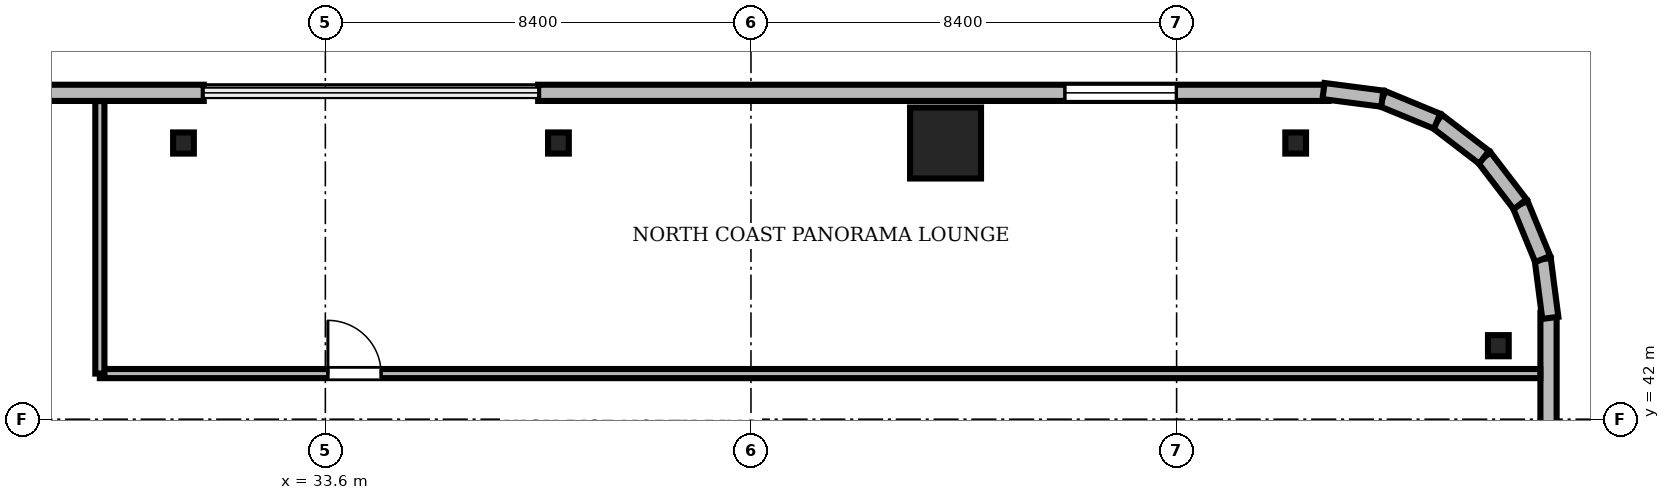
"""IFC4 building model, lengths in metres.
Left out: names, types, materials, properties, quantities, classifications, styles, units other than length and angle.
Written with IfcOpenShell. Run it as: python <this file> out.ifc"""

import sys

from ifc_helpers import new_model, si_unit, direction, frame, frame_2d, origin, origin_2d, place, context, subcontext, project, spatial, rectangle, i_section, extrude, source, transform, mapped, element, fill, save


model = new_model("IFC4")
c1 = context("Model", 3, precision=1e-05, world=origin(), true_north=direction((0.0, 1.0)))
c2 = subcontext(c1, "Body", "Model", "MODEL_VIEW")
j1 = project(units=[si_unit("LENGTHUNIT", "METRE"), si_unit("PLANEANGLEUNIT", "RADIAN")], contexts=[c1])
p1 = place(None, origin())
s1 = spatial("IfcSite", under=j1, at=p1, CompositionType="ELEMENT")
p2 = place(p1, origin())
s2 = spatial("IfcBuilding", under=s1, at=p2, CompositionType="ELEMENT")
p3 = place(p2, frame((0.0, 0.0, 222.3)))
s3 = spatial("IfcBuildingStorey", under=s2, at=p3, CompositionType="ELEMENT", Elevation=222.3)
m1 = source(origin(), c2, "Body", "SweptSolid", [
    extrude(rectangle(XDim=1.4, YDim=1.4, at=origin_2d()), origin(), (0.0, 0.0, 1.0), 3.53),
])
p4 = place(p3, frame((45.84, 47.45, 0.0), z_axis=(0.0, 0.0, 1.0), x_axis=(1.0, 0.0, 0.0)))
e1 = element("IfcColumn", 1, at=p4, inside=s3, PredefinedType="COLUMN", context=c2, shape_type="MappedRepresentation", body=[
    mapped(m1, transform((0.0, 0.0, 0.0), scale=1.0)),
])
m2 = source(origin(), c2, "Body", "SweptSolid", [
    extrude(i_section(OverallWidth=0.409, OverallDepth=0.417, WebThickness=0.021, FlangeThickness=0.033, FilletRadius=0.015, at=origin_2d()), origin(), (0.0, 0.0, 1.0), 3.53),
])
for number, where, z_axis, x_axis in (
    (2, (56.75, 43.45, 0.0), (0.0, 0.0, 1.0), (1.0, 0.0, 0.0)),
    (3, (52.75, 47.45, 0.0), (0.0, 0.0, 1.0), (1.0, 0.0, 0.0)),
    (4, (38.2, 47.45, 0.0), (0.0, 0.0, 1.0), (1.0, 0.0, 0.0)),
    (5, (30.8, 47.45, 0.0), (0.0, 0.0, 1.0), (1.0, 0.0, 0.0)),
):
    element("IfcColumn", number, at=place(p3, frame(where, z_axis=z_axis, x_axis=x_axis)), inside=s3, PredefinedType="COLUMN", context=c2, shape_type="MappedRepresentation", body=[
        mapped(m2, transform((0.0, 0.0, 0.0), scale=1.0)),
    ])
m3 = source(origin(), c2, "Body", "SweptSolid", [
    extrude(rectangle(XDim=15.6, YDim=0.32, at=frame_2d((7.8, 0.0))), origin(), (0.0, 0.0, 1.0), 3.53),
])
p5 = place(p3, frame((53.4, 48.44, 0.0), z_axis=(0.0, 0.0, 1.0), x_axis=(-1.0, 0.0, 0.0)))
e6 = element("IfcWall", 6, at=p5, inside=s3, PredefinedType="SOLIDWALL", context=c2, shape_type="MappedRepresentation", body=[
    mapped(m3, transform((0.0, 0.0, 0.0), scale=1.0)),
])
m4 = source(origin(), c2, "Body", "SweptSolid", [
    extrude(rectangle(XDim=2.2, YDim=2.4, at=frame_2d((1.1, 1.2))), frame((0.0, 0.17, 0.0), z_axis=(0.0, -1.0, 0.0), x_axis=(1.0, 0.0, 0.0)), (0.0, 0.0, 1.0), 0.34),
])
p6 = place(p5, frame((3.005, 0.0, 0.72)))
e7 = element("IfcOpeningElement", 7, at=p6, cuts=e6, PredefinedType="OPENING", context=c2, shape_type="MappedRepresentation", body=[
    mapped(m4, transform((0.0, 0.0, 0.0), scale=1.0)),
])
p7 = place(p3, frame((31.2, 48.44, 0.0), z_axis=(0.0, 0.0, 1.0), x_axis=(-1.0, 0.0, 0.0)))
e8 = element("IfcWall", 8, at=p7, inside=s3, PredefinedType="SOLIDWALL", context=c2, shape_type="MappedRepresentation", body=[
    mapped(m3, transform((0.0, 0.0, 0.0), scale=1.0)),
])
m5 = source(origin(), c2, "Body", "SweptSolid", [
    extrude(rectangle(XDim=1.4, YDim=2.3, at=frame_2d((0.7, 1.15))), frame((0.0, 0.17, 0.0), z_axis=(0.0, -1.0, 0.0), x_axis=(1.0, 0.0, 0.0)), (0.0, 0.0, 1.0), 0.34),
])
p8 = place(p7, frame((4.59, 0.0, 0.0)))
e9 = element("IfcOpeningElement", 9, at=p8, cuts=e8, PredefinedType="OPENING", context=c2, shape_type="MappedRepresentation", body=[
    mapped(m5, transform((0.0, 0.0, 0.0), scale=1.0)),
])
p9 = place(p7, frame((10.395, 0.0, 0.72)))
e10 = element("IfcOpeningElement", 10, at=p9, cuts=e8, PredefinedType="OPENING", context=c2, shape_type="MappedRepresentation", body=[
    mapped(m4, transform((0.0, 0.0, 0.0), scale=1.0)),
])
m6 = source(origin(), c2, "Body", "SweptSolid", [
    extrude(rectangle(XDim=15.6, YDim=0.32, at=frame_2d((7.8, 0.0))), origin(), (0.0, 0.0, 1.0), 3.53),
])
p10 = place(p3, frame((57.74, 28.5, 0.0), z_axis=(0.0, 0.0, 1.0), x_axis=(0.0, 1.0, 0.0)))
e11 = element("IfcWall", 11, at=p10, inside=s3, PredefinedType="SOLIDWALL", context=c2, shape_type="MappedRepresentation", body=[
    mapped(m6, transform((0.0, 0.0, 0.0), scale=1.0)),
])
p11 = place(p10, frame((10.395, 0.0, 0.72)))
e12 = element("IfcOpeningElement", 12, at=p11, cuts=e11, PredefinedType="OPENING", context=c2, shape_type="MappedRepresentation", body=[
    mapped(m4, transform((0.0, 0.0, 0.0), scale=1.0)),
])
m7 = source(origin(), c2, "Body", "SweptSolid", [
    extrude(rectangle(XDim=1.17, YDim=0.32, at=frame_2d((0.585, 0.0))), origin(), (0.0, 0.0, 1.0), 3.53),
])
p12 = place(p3, frame((57.776, 44.0, 0.0), z_axis=(0.0, 0.0, 1.0), x_axis=(-0.128295670475, 0.991735963317, 0.0)))
e13 = element("IfcWall", 13, at=p12, inside=s3, PredefinedType="SOLIDWALL", context=c2, shape_type="MappedRepresentation", body=[
    mapped(m7, transform((0.0, 0.0, 0.0), scale=1.0)),
])
m8 = source(origin(), c2, "Body", "SweptSolid", [
    extrude(rectangle(XDim=1.169, YDim=0.32, at=frame_2d((0.584, 0.0))), origin(), (0.0, 0.0, 1.0), 3.53),
])
p13 = place(p3, frame((57.625, 45.16, 0.0), z_axis=(0.0, 0.0, 1.0), x_axis=(-0.381054331552, 0.924552646638, 0.0)))
e14 = element("IfcWall", 14, at=p13, inside=s3, PredefinedType="SOLIDWALL", context=c2, shape_type="MappedRepresentation", body=[
    mapped(m8, transform((0.0, 0.0, 0.0), scale=1.0)),
])
m9 = source(origin(), c2, "Body", "SweptSolid", [
    extrude(rectangle(XDim=1.169, YDim=0.32, at=frame_2d((0.584, 0.0))), origin(), (0.0, 0.0, 1.0), 3.53),
])
p14 = place(p3, frame((57.18, 46.241, 0.0), z_axis=(0.0, 0.0, 1.0), x_axis=(-0.608387696831, 0.793639975269, 0.0)))
e15 = element("IfcWall", 15, at=p14, inside=s3, PredefinedType="SOLIDWALL", context=c2, shape_type="MappedRepresentation", body=[
    mapped(m9, transform((0.0, 0.0, 0.0), scale=1.0)),
])
m10 = source(origin(), c2, "Body", "SweptSolid", [
    extrude(rectangle(XDim=1.169, YDim=0.32, at=frame_2d((0.584, 0.0))), origin(), (0.0, 0.0, 1.0), 3.53),
])
p15 = place(p3, frame((56.469, 47.169, 0.0), z_axis=(0.0, 0.0, 1.0), x_axis=(-0.793663520347, 0.608356981114, 0.0)))
e16 = element("IfcWall", 16, at=p15, inside=s3, PredefinedType="SOLIDWALL", context=c2, shape_type="MappedRepresentation", body=[
    mapped(m10, transform((0.0, 0.0, 0.0), scale=1.0)),
])
p16 = place(p3, frame((55.541, 47.88, 0.0), z_axis=(0.0, 0.0, 1.0), x_axis=(-0.924552646638, 0.381054331552, 0.0)))
e17 = element("IfcWall", 17, at=p16, inside=s3, PredefinedType="SOLIDWALL", context=c2, shape_type="MappedRepresentation", body=[
    mapped(m8, transform((0.0, 0.0, 0.0), scale=1.0)),
])
p17 = place(p3, frame((54.46, 48.325, 0.0), z_axis=(0.0, 0.0, 1.0), x_axis=(-0.991735963317, 0.128295670475, 0.0)))
e18 = element("IfcWall", 18, at=p17, inside=s3, PredefinedType="SOLIDWALL", context=c2, shape_type="MappedRepresentation", body=[
    mapped(m7, transform((0.0, 0.0, 0.0), scale=1.0)),
])
m11 = source(origin(), c2, "Body", "SweptSolid", [
    extrude(rectangle(XDim=28.428, YDim=0.18, at=frame_2d((14.214, 0.0))), origin(), (0.0, 0.0, 1.0), 2.772),
])
p18 = place(p3, frame((29.15, 42.9, 0.0), z_axis=(0.0, 0.0, 1.0), x_axis=(1.0, 0.0, 0.0)))
e19 = element("IfcWall", 19, at=p18, inside=s3, PredefinedType="PARTITIONING", context=c2, shape_type="MappedRepresentation", body=[
    mapped(m11, transform((0.0, 0.0, 0.0), scale=1.0)),
])
m12 = source(origin(), c2, "Body", "SweptSolid", [
    extrude(rectangle(XDim=1.05, YDim=2.2, at=frame_2d((0.525, 1.1))), frame((0.0, 0.1, 0.0), z_axis=(0.0, -1.0, 0.0), x_axis=(1.0, 0.0, 0.0)), (0.0, 0.0, 1.0), 0.2),
])
p19 = place(p18, frame((4.5, 0.0, 0.0)))
e20 = element("IfcOpeningElement", 20, at=p19, cuts=e19, PredefinedType="OPENING", context=c2, shape_type="MappedRepresentation", body=[
    mapped(m12, transform((0.0, 0.0, 0.0), scale=1.0)),
])
m13 = source(origin(), c2, "Body", "SweptSolid", [
    extrude(rectangle(XDim=5.378, YDim=0.18, at=frame_2d((2.689, 0.0))), origin(), (0.0, 0.0, 1.0), 2.772),
])
p20 = place(p3, frame((29.15, 42.9, 0.0), z_axis=(0.0, 0.0, 1.0), x_axis=(0.0, 1.0, 0.0)))
e21 = element("IfcWall", 21, at=p20, inside=s3, PredefinedType="PARTITIONING", context=c2, shape_type="MappedRepresentation", body=[
    mapped(m13, transform((0.0, 0.0, 0.0), scale=1.0)),
])
m14 = source(origin(), c2, "Body", "SweptSolid", [
    extrude(rectangle(XDim=2.2, YDim=2.4, at=frame_2d((1.1, 1.2))), frame((0.0, 0.03, 0.0), z_axis=(0.0, -1.0, 0.0), x_axis=(1.0, 0.0, 0.0)), (0.0, 0.0, 1.0), 0.06),
])
p21 = place(p6, origin())
e22 = element("IfcWindow", 22, at=p21, inside=s3, PartitioningType="SINGLE_PANEL", PredefinedType="WINDOW", context=c2, shape_type="MappedRepresentation", body=[
    mapped(m14, transform((0.0, 0.0, 0.0), scale=1.0)),
])
fill(e7, e22)
m15 = source(origin(), c2, "Body", "SweptSolid", [
    extrude(rectangle(XDim=1.05, YDim=2.2, at=frame_2d((0.525, 1.1))), frame((0.0, 0.025, 0.0), z_axis=(0.0, -1.0, 0.0), x_axis=(1.0, 0.0, 0.0)), (0.0, 0.0, 1.0), 0.05),
])
p22 = place(p19, origin())
e23 = element("IfcDoor", 23, at=p22, inside=s3, OperationType="SINGLE_SWING_LEFT", PredefinedType="DOOR", context=c2, shape_type="MappedRepresentation", body=[
    mapped(m15, transform((0.0, 0.0, 0.0), scale=1.0)),
])
fill(e20, e23)
save(model, sys.argv[1])
